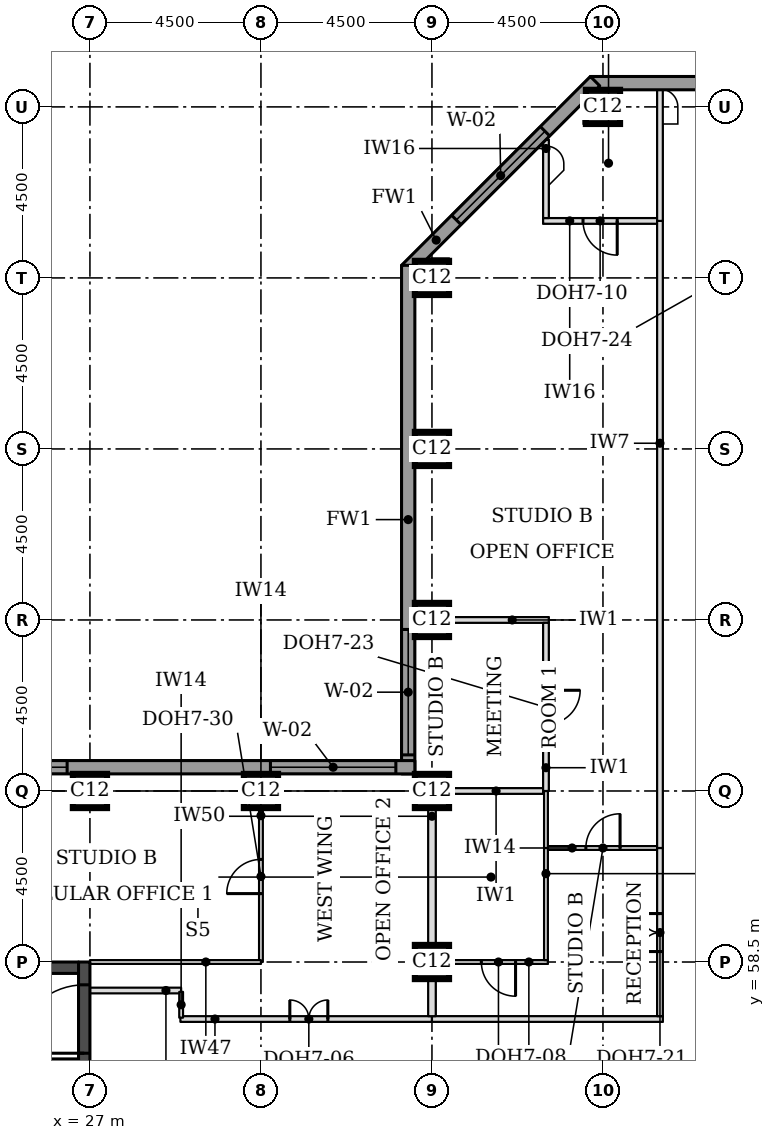
"""IFC4 building model, lengths in metres.
Left out: names, types, materials, properties, quantities, classifications, styles, units other than length and angle.
Written with IfcOpenShell. Run it as: python <this file> out.ifc"""

import sys

from ifc_helpers import new_model, si_unit, direction, frame, frame_2d, origin, origin_2d, place, context, subcontext, project, spatial, rectangle, extrude, element, fill, save


model = new_model("IFC4")
c1 = context("Model", 3, precision=1e-05, world=origin(), true_north=direction((0.0, 1.0)))
c2 = subcontext(c1, "Body", "Model", "MODEL_VIEW")
j1 = project(units=[si_unit("LENGTHUNIT", "METRE"), si_unit("PLANEANGLEUNIT", "RADIAN")], contexts=[c1])
p1 = place(None, origin())
s1 = spatial("IfcSite", under=j1, at=p1, CompositionType="ELEMENT")
p2 = place(p1, origin())
s2 = spatial("IfcBuilding", under=s1, at=p2, CompositionType="ELEMENT")
p3 = place(p2, frame((0.0, 0.0, 192.1)))
s3 = spatial("IfcBuildingStorey", under=s2, at=p3, CompositionType="ELEMENT", Elevation=192.1)
for number, where, z_axis, x_axis in (
    (1, (36.0, 58.5, 0.0), (0.0, 0.0, 1.0), (1.0, 0.0, 0.0)),
    (2, (27.0, 63.0, 0.0), (0.0, 0.0, 1.0), (1.0, 0.0, 0.0)),
    (3, (31.5, 63.0, 0.0), (0.0, 0.0, 1.0), (1.0, 0.0, 0.0)),
    (4, (36.0, 63.0, 0.0), (0.0, 0.0, 1.0), (1.0, 0.0, 0.0)),
    (5, (36.0, 67.5, 0.0), (0.0, 0.0, 1.0), (1.0, 0.0, 0.0)),
    (6, (36.0, 72.0, 0.0), (0.0, 0.0, 1.0), (1.0, 0.0, 0.0)),
    (7, (36.0, 76.5, 0.0), (0.0, 0.0, 1.0), (1.0, 0.0, 0.0)),
    (8, (40.5, 81.0, 0.0), (0.0, 0.0, 1.0), (1.0, 0.0, 0.0)),
):
    element("IfcColumn", number, at=place(p3, frame(where, z_axis=z_axis, x_axis=x_axis)), inside=s3, PredefinedType="COLUMN", context=c2, shape_type="SweptSolid", body=[
        extrude(rectangle(XDim=0.9, YDim=0.9, at=origin_2d()), origin(), (0.0, 0.0, 1.0), 3.7),
    ])
p4 = place(p3, frame((18.3, 58.35, 0.0), z_axis=(0.0, 0.0, 1.0), x_axis=(1.0, 0.0, 0.0)))
e9 = element("IfcWall", 9, at=p4, inside=s3, PredefinedType="SHEAR", context=c2, shape_type="SweptSolid", body=[
    extrude(rectangle(XDim=8.4, YDim=0.3, at=frame_2d((4.2, 0.0))), origin(), (0.0, 0.0, 1.0), 3.7),
])
p5 = place(p3, frame((26.85, 49.5, 0.0), z_axis=(0.0, 0.0, 1.0), x_axis=(0.0, 1.0, 0.0)))
e10 = element("IfcWall", 10, at=p5, inside=s3, PredefinedType="SHEAR", context=c2, shape_type="SweptSolid", body=[
    extrude(rectangle(XDim=9.0, YDim=0.3, at=frame_2d((4.5, 0.0))), origin(), (0.0, 0.0, 1.0), 3.7),
])
p6 = place(p5, frame((6.6, 0.0, 0.0)))
e11 = element("IfcOpeningElement", 11, at=p6, cuts=e10, PredefinedType="OPENING", context=c2, shape_type="SweptSolid", body=[
    extrude(rectangle(XDim=1.8, YDim=2.1, at=frame_2d((0.9, 1.05))), frame((0.0, 0.16, 0.0), z_axis=(0.0, -1.0, 0.0), x_axis=(1.0, 0.0, 0.0)), (0.0, 0.0, 1.0), 0.32),
])
p7 = place(p3, frame((72.331, 81.625, 0.0), z_axis=(0.0, 0.0, 1.0), x_axis=(-1.0, 0.0, 0.0)))
e12 = element("IfcWall", 12, at=p7, inside=s3, PredefinedType="STANDARD", context=c2, shape_type="SweptSolid", body=[
    extrude(rectangle(XDim=32.163, YDim=0.35, at=frame_2d((16.081, 0.0))), origin(), (0.0, 0.0, 1.0), 3.525),
])
p8 = place(p7, frame((5.431, 0.0, 0.9)))
e13 = element("IfcOpeningElement", 13, at=p8, cuts=e12, PredefinedType="OPENING", context=c2, shape_type="SweptSolid", body=[
    extrude(rectangle(XDim=3.3, YDim=1.9, at=frame_2d((1.65, 0.95))), frame((0.0, 0.185, 0.0), z_axis=(0.0, -1.0, 0.0), x_axis=(1.0, 0.0, 0.0)), (0.0, 0.0, 1.0), 0.37),
])
p9 = place(p7, frame((9.931, 0.0, 0.9)))
e14 = element("IfcOpeningElement", 14, at=p9, cuts=e12, PredefinedType="OPENING", context=c2, shape_type="SweptSolid", body=[
    extrude(rectangle(XDim=3.3, YDim=1.9, at=frame_2d((1.65, 0.95))), frame((0.0, 0.185, 0.0), z_axis=(0.0, -1.0, 0.0), x_axis=(1.0, 0.0, 0.0)), (0.0, 0.0, 1.0), 0.37),
])
p10 = place(p7, frame((14.431, 0.0, 0.9)))
e15 = element("IfcOpeningElement", 15, at=p10, cuts=e12, PredefinedType="OPENING", context=c2, shape_type="SweptSolid", body=[
    extrude(rectangle(XDim=3.3, YDim=1.9, at=frame_2d((1.65, 0.95))), frame((0.0, 0.185, 0.0), z_axis=(0.0, -1.0, 0.0), x_axis=(1.0, 0.0, 0.0)), (0.0, 0.0, 1.0), 0.37),
])
p11 = place(p7, frame((18.931, 0.0, 0.9)))
e16 = element("IfcOpeningElement", 16, at=p11, cuts=e12, PredefinedType="OPENING", context=c2, shape_type="SweptSolid", body=[
    extrude(rectangle(XDim=3.3, YDim=1.9, at=frame_2d((1.65, 0.95))), frame((0.0, 0.185, 0.0), z_axis=(0.0, -1.0, 0.0), x_axis=(1.0, 0.0, 0.0)), (0.0, 0.0, 1.0), 0.37),
])
p12 = place(p7, frame((23.431, 0.0, 0.9)))
e17 = element("IfcOpeningElement", 17, at=p12, cuts=e12, PredefinedType="OPENING", context=c2, shape_type="SweptSolid", body=[
    extrude(rectangle(XDim=3.3, YDim=1.9, at=frame_2d((1.65, 0.95))), frame((0.0, 0.185, 0.0), z_axis=(0.0, -1.0, 0.0), x_axis=(1.0, 0.0, 0.0)), (0.0, 0.0, 1.0), 0.37),
])
p13 = place(p3, frame((40.292, 81.676, 0.0), z_axis=(0.0, 0.0, 1.0), x_axis=(-0.707106781187, -0.707106781187, 0.0)))
e18 = element("IfcWall", 18, at=p13, inside=s3, PredefinedType="STANDARD", context=c2, shape_type="SweptSolid", body=[
    extrude(rectangle(XDim=7.027, YDim=0.35, at=frame_2d((3.513, 0.0))), origin(), (0.0, 0.0, 1.0), 3.525),
])
p14 = place(p13, frame((1.863, 0.0, 0.9)))
e19 = element("IfcOpeningElement", 19, at=p14, cuts=e18, PredefinedType="OPENING", context=c2, shape_type="SweptSolid", body=[
    extrude(rectangle(XDim=3.3, YDim=1.9, at=frame_2d((1.65, 0.95))), frame((0.0, 0.185, 0.0), z_axis=(0.0, -1.0, 0.0), x_axis=(1.0, 0.0, 0.0)), (0.0, 0.0, 1.0), 0.37),
])
p15 = place(p3, frame((35.375, 76.831, 0.0), z_axis=(0.0, 0.0, 1.0), x_axis=(0.0, -1.0, 0.0)))
e20 = element("IfcWall", 20, at=p15, inside=s3, PredefinedType="STANDARD", context=c2, shape_type="SweptSolid", body=[
    extrude(rectangle(XDim=13.381, YDim=0.35, at=frame_2d((6.691, 0.0))), origin(), (0.0, 0.0, 1.0), 3.525),
])
p16 = place(p15, frame((9.581, 0.0, 0.9)))
e21 = element("IfcOpeningElement", 21, at=p16, cuts=e20, PredefinedType="OPENING", context=c2, shape_type="SweptSolid", body=[
    extrude(rectangle(XDim=3.3, YDim=1.9, at=frame_2d((1.65, 0.95))), frame((0.0, 0.185, 0.0), z_axis=(0.0, -1.0, 0.0), x_axis=(1.0, 0.0, 0.0)), (0.0, 0.0, 1.0), 0.37),
])
p17 = place(p3, frame((35.55, 63.625, 0.0), z_axis=(0.0, 0.0, 1.0), x_axis=(-1.0, 0.0, 0.0)))
e22 = element("IfcWall", 22, at=p17, inside=s3, PredefinedType="STANDARD", context=c2, shape_type="SweptSolid", body=[
    extrude(rectangle(XDim=17.881, YDim=0.35, at=frame_2d((8.941, 0.0))), origin(), (0.0, 0.0, 1.0), 3.525),
])
p18 = place(p17, frame((0.5, 0.0, 0.9)))
e23 = element("IfcOpeningElement", 23, at=p18, cuts=e22, PredefinedType="OPENING", context=c2, shape_type="SweptSolid", body=[
    extrude(rectangle(XDim=3.3, YDim=1.9, at=frame_2d((1.65, 0.95))), frame((0.0, 0.185, 0.0), z_axis=(0.0, -1.0, 0.0), x_axis=(1.0, 0.0, 0.0)), (0.0, 0.0, 1.0), 0.37),
])
p19 = place(p17, frame((9.15, 0.0, 0.9)))
e24 = element("IfcOpeningElement", 24, at=p19, cuts=e22, PredefinedType="OPENING", context=c2, shape_type="SweptSolid", body=[
    extrude(rectangle(XDim=3.3, YDim=1.9, at=frame_2d((1.65, 0.95))), frame((0.0, 0.185, 0.0), z_axis=(0.0, -1.0, 0.0), x_axis=(1.0, 0.0, 0.0)), (0.0, 0.0, 1.0), 0.37),
])
p20 = place(p3, frame((29.38, 57.0, 0.0), z_axis=(0.0, 0.0, 1.0), x_axis=(1.0, 0.0, 0.0)))
e25 = element("IfcWall", 25, at=p20, inside=s3, PredefinedType="PARTITIONING", context=c2, shape_type="SweptSolid", body=[
    extrude(rectangle(XDim=6.62, YDim=0.15, at=frame_2d((3.31, 0.0))), origin(), (0.0, 0.0, 1.0), 3.55),
])
p21 = place(p20, frame((2.88, 0.0, 0.0)))
e26 = element("IfcOpeningElement", 26, at=p21, cuts=e25, PredefinedType="OPENING", context=c2, shape_type="SweptSolid", body=[
    extrude(rectangle(XDim=1.0, YDim=2.1, at=frame_2d((0.5, 1.05))), frame((0.0, 0.085, 0.0), z_axis=(0.0, -1.0, 0.0), x_axis=(1.0, 0.0, 0.0)), (0.0, 0.0, 1.0), 0.17),
])
p22 = place(p3, frame((36.0, 57.0, 0.0), z_axis=(0.0, 0.0, 1.0), x_axis=(1.0, 0.0, 0.0)))
e27 = element("IfcWall", 27, at=p22, inside=s3, PredefinedType="PARTITIONING", context=c2, shape_type="SweptSolid", body=[
    extrude(rectangle(XDim=6.075, YDim=0.15, at=frame_2d((3.038, 0.0))), origin(), (0.0, 0.0, 1.0), 3.55),
])
p23 = place(p3, frame((36.45, 58.5, 0.0), z_axis=(0.0, 0.0, 1.0), x_axis=(1.0, 0.0, 0.0)))
e28 = element("IfcWall", 28, at=p23, inside=s3, PredefinedType="PARTITIONING", context=c2, shape_type="SweptSolid", body=[
    extrude(rectangle(XDim=2.6, YDim=0.1, at=frame_2d((1.3, 0.0))), origin(), (0.0, 0.0, 1.0), 3.55),
])
p24 = place(p23, frame((0.85, 0.0, 0.0)))
e29 = element("IfcOpeningElement", 29, at=p24, cuts=e28, PredefinedType="OPENING", context=c2, shape_type="SweptSolid", body=[
    extrude(rectangle(XDim=0.9, YDim=2.1, at=frame_2d((0.45, 1.05))), frame((0.0, 0.06, 0.0), z_axis=(0.0, -1.0, 0.0), x_axis=(1.0, 0.0, 0.0)), (0.0, 0.0, 1.0), 0.12),
])
p25 = place(p3, frame((39.05, 61.5, 0.0), z_axis=(0.0, 0.0, 1.0), x_axis=(1.0, 0.0, 0.0)))
e30 = element("IfcWall", 30, at=p25, inside=s3, PredefinedType="PARTITIONING", context=c2, shape_type="SweptSolid", body=[
    extrude(rectangle(XDim=2.875, YDim=0.1, at=frame_2d((1.438, 0.0))), origin(), (0.0, 0.0, 1.0), 3.55),
])
p26 = place(p25, frame((1.0, 0.0, 0.0)))
e31 = element("IfcOpeningElement", 31, at=p26, cuts=e30, PredefinedType="OPENING", context=c2, shape_type="SweptSolid", body=[
    extrude(rectangle(XDim=0.9, YDim=2.1, at=frame_2d((0.45, 1.05))), frame((0.0, 0.06, 0.0), z_axis=(0.0, -1.0, 0.0), x_axis=(1.0, 0.0, 0.0)), (0.0, 0.0, 1.0), 0.12),
])
p27 = place(p3, frame((36.45, 63.0, 0.0), z_axis=(0.0, 0.0, 1.0), x_axis=(1.0, 0.0, 0.0)))
e32 = element("IfcWall", 32, at=p27, inside=s3, PredefinedType="PARTITIONING", context=c2, shape_type="SweptSolid", body=[
    extrude(rectangle(XDim=2.475, YDim=0.15, at=frame_2d((1.238, 0.0))), origin(), (0.0, 0.0, 1.0), 3.55),
])
p28 = place(p3, frame((35.55, 67.5, 0.0), z_axis=(0.0, 0.0, 1.0), x_axis=(1.0, 0.0, 0.0)))
e33 = element("IfcWall", 33, at=p28, inside=s3, PredefinedType="PARTITIONING", context=c2, shape_type="SweptSolid", body=[
    extrude(rectangle(XDim=3.525, YDim=0.15, at=frame_2d((1.762, 0.0))), origin(), (0.0, 0.0, 1.0), 3.55),
])
p29 = place(p3, frame((38.925, 78.0, 0.0), z_axis=(0.0, 0.0, 1.0), x_axis=(1.0, 0.0, 0.0)))
e34 = element("IfcWall", 34, at=p29, inside=s3, PredefinedType="PARTITIONING", context=c2, shape_type="SweptSolid", body=[
    extrude(rectangle(XDim=3.0, YDim=0.15, at=frame_2d((1.5, 0.0))), origin(), (0.0, 0.0, 1.0), 3.55),
])
p30 = place(p29, frame((1.05, 0.0, 0.0)))
e35 = element("IfcOpeningElement", 35, at=p30, cuts=e34, PredefinedType="OPENING", context=c2, shape_type="SweptSolid", body=[
    extrude(rectangle(XDim=0.9, YDim=2.1, at=frame_2d((0.45, 1.05))), frame((0.0, 0.085, 0.0), z_axis=(0.0, -1.0, 0.0), x_axis=(1.0, 0.0, 0.0)), (0.0, 0.0, 1.0), 0.17),
])
p31 = place(p3, frame((36.0, 57.075, 0.0), z_axis=(0.0, 0.0, 1.0), x_axis=(0.0, 1.0, 0.0)))
e36 = element("IfcWall", 36, at=p31, inside=s3, PredefinedType="PARTITIONING", context=c2, shape_type="SweptSolid", body=[
    extrude(rectangle(XDim=0.975, YDim=0.2, at=frame_2d((0.488, 0.0))), origin(), (0.0, 0.0, 1.0), 2.8),
])
p32 = place(p3, frame((42.0, 57.075, 0.0), z_axis=(0.0, 0.0, 1.0), x_axis=(0.0, 1.0, 0.0)))
e37 = element("IfcWall", 37, at=p32, inside=s3, PredefinedType="PARTITIONING", context=c2, shape_type="SweptSolid", body=[
    extrude(rectangle(XDim=4.425, YDim=0.15, at=frame_2d((2.212, 0.0))), origin(), (0.0, 0.0, 1.0), 3.55),
])
p33 = place(p32, frame((1.7, 0.0, 0.0)))
e38 = element("IfcOpeningElement", 38, at=p33, cuts=e37, PredefinedType="OPENING", context=c2, shape_type="SweptSolid", body=[
    extrude(rectangle(XDim=1.0, YDim=2.1, at=frame_2d((0.5, 1.05))), frame((0.0, 0.085, 0.0), z_axis=(0.0, -1.0, 0.0), x_axis=(1.0, 0.0, 0.0)), (0.0, 0.0, 1.0), 0.17),
])
p34 = place(p3, frame((39.0, 58.55, 0.0), z_axis=(0.0, 0.0, 1.0), x_axis=(0.0, 1.0, 0.0)))
e39 = element("IfcWall", 39, at=p34, inside=s3, PredefinedType="PARTITIONING", context=c2, shape_type="SweptSolid", body=[
    extrude(rectangle(XDim=2.95, YDim=0.1, at=frame_2d((1.475, 0.0))), origin(), (0.0, 0.0, 1.0), 3.55),
])
p35 = place(p3, frame((36.0, 58.92, 0.0), z_axis=(0.0, 0.0, 1.0), x_axis=(0.0, 1.0, 0.0)))
e40 = element("IfcWall", 40, at=p35, inside=s3, PredefinedType="PARTITIONING", context=c2, shape_type="SweptSolid", body=[
    extrude(rectangle(XDim=3.63, YDim=0.2, at=frame_2d((1.815, 0.0))), origin(), (0.0, 0.0, 1.0), 2.8),
])
p36 = place(p3, frame((39.0, 61.5, 0.0), z_axis=(0.0, 0.0, 1.0), x_axis=(0.0, 1.0, 0.0)))
e41 = element("IfcWall", 41, at=p36, inside=s3, PredefinedType="PARTITIONING", context=c2, shape_type="SweptSolid", body=[
    extrude(rectangle(XDim=1.5, YDim=0.1, at=frame_2d((0.75, 0.0))), origin(), (0.0, 0.0, 1.0), 3.55),
])
p37 = place(p3, frame((42.0, 61.5, 0.0), z_axis=(0.0, 0.0, 1.0), x_axis=(0.0, 1.0, 0.0)))
e42 = element("IfcWall", 42, at=p37, inside=s3, PredefinedType="PARTITIONING", context=c2, shape_type="SweptSolid", body=[
    extrude(rectangle(XDim=16.5, YDim=0.15, at=frame_2d((8.25, 0.0))), origin(), (0.0, 0.0, 1.0), 3.55),
])
p38 = place(p3, frame((39.0, 63.0, 0.0), z_axis=(0.0, 0.0, 1.0), x_axis=(0.0, 1.0, 0.0)))
e43 = element("IfcWall", 43, at=p38, inside=s3, PredefinedType="PARTITIONING", context=c2, shape_type="SweptSolid", body=[
    extrude(rectangle(XDim=4.425, YDim=0.15, at=frame_2d((2.212, 0.0))), origin(), (0.0, 0.0, 1.0), 3.55),
])
p39 = place(p38, frame((1.75, 0.0, 0.0)))
e44 = element("IfcOpeningElement", 44, at=p39, cuts=e43, PredefinedType="OPENING", context=c2, shape_type="SweptSolid", body=[
    extrude(rectangle(XDim=0.9, YDim=2.1, at=frame_2d((0.45, 1.05))), frame((0.0, 0.085, 0.0), z_axis=(0.0, -1.0, 0.0), x_axis=(1.0, 0.0, 0.0)), (0.0, 0.0, 1.0), 0.17),
])
p40 = place(p3, frame((42.0, 78.0, 0.0), z_axis=(0.0, 0.0, 1.0), x_axis=(0.0, 1.0, 0.0)))
e45 = element("IfcWall", 45, at=p40, inside=s3, PredefinedType="PARTITIONING", context=c2, shape_type="SweptSolid", body=[
    extrude(rectangle(XDim=3.45, YDim=0.15, at=frame_2d((1.725, 0.0))), origin(), (0.0, 0.0, 1.0), 3.55),
])
p41 = place(p3, frame((39.0, 78.075, 0.0), z_axis=(0.0, 0.0, 1.0), x_axis=(0.0, 1.0, 0.0)))
e46 = element("IfcWall", 46, at=p41, inside=s3, PredefinedType="PARTITIONING", context=c2, shape_type="SweptSolid", body=[
    extrude(rectangle(XDim=2.062, YDim=0.15, at=frame_2d((1.031, 0.0))), origin(), (0.0, 0.0, 1.0), 3.55),
])
p42 = place(p3, frame((31.5, 63.0, 0.0), z_axis=(0.0, 0.0, 1.0), x_axis=(0.0, -1.0, 0.0)))
e47 = element("IfcWall", 47, at=p42, inside=s3, PredefinedType="PARTITIONING", context=c2, shape_type="SweptSolid", body=[
    extrude(rectangle(XDim=4.5, YDim=0.1, at=frame_2d((2.25, 0.0))), origin(), (0.0, 0.0, 1.0), 3.55),
])
p43 = place(p42, frame((1.8, 0.0, 0.0)))
e48 = element("IfcOpeningElement", 48, at=p43, cuts=e47, PredefinedType="OPENING", context=c2, shape_type="SweptSolid", body=[
    extrude(rectangle(XDim=0.9, YDim=2.1, at=frame_2d((0.45, 1.05))), frame((0.0, 0.06, 0.0), z_axis=(0.0, -1.0, 0.0), x_axis=(1.0, 0.0, 0.0)), (0.0, 0.0, 1.0), 0.12),
])
p44 = place(p3, frame((31.5, 58.5, 0.0), z_axis=(0.0, 0.0, 1.0), x_axis=(-1.0, 0.0, 0.0)))
e49 = element("IfcWall", 49, at=p44, inside=s3, PredefinedType="PARTITIONING", context=c2, shape_type="SweptSolid", body=[
    extrude(rectangle(XDim=4.5, YDim=0.1, at=frame_2d((2.25, 0.0))), origin(), (0.0, 0.0, 1.0), 2.55),
])
p45 = place(p3, frame((27.0, 57.75, 0.0), z_axis=(0.0, 0.0, 1.0), x_axis=(1.0, 0.0, 0.0)))
e50 = element("IfcWall", 50, at=p45, inside=s3, PredefinedType="PARTITIONING", context=c2, shape_type="SweptSolid", body=[
    extrude(rectangle(XDim=2.4, YDim=0.15, at=frame_2d((1.2, 0.0))), origin(), (0.0, 0.0, 1.0), 3.55),
])
p46 = place(p3, frame((29.4, 57.715, 0.0), z_axis=(0.0, 0.0, 1.0), x_axis=(0.0, -1.0, 0.0)))
e51 = element("IfcWall", 51, at=p46, inside=s3, PredefinedType="PARTITIONING", context=c2, shape_type="SweptSolid", body=[
    extrude(rectangle(XDim=0.68, YDim=0.1, at=frame_2d((0.34, 0.0))), origin(), (0.0, 0.0, 1.0), 3.55),
])
p47 = place(p3, frame((23.2, 55.85, 0.0), z_axis=(0.0, 0.0, 1.0), x_axis=(1.0, 0.0, 0.0)))
e52 = element("IfcWall", 52, at=p47, inside=s3, PredefinedType="SOLIDWALL", context=c2, shape_type="SweptSolid", body=[
    extrude(rectangle(XDim=3.5, YDim=0.2, at=frame_2d((1.75, 0.0))), origin(), (0.0, 0.0, 1.0), 3.55),
])
p48 = place(p47, frame((1.2, 0.0, 0.0)))
e53 = element("IfcOpeningElement", 53, at=p48, cuts=e52, PredefinedType="OPENING", context=c2, shape_type="SweptSolid", body=[
    extrude(rectangle(XDim=1.1, YDim=2.1, at=frame_2d((0.55, 1.05))), frame((0.0, 0.11, 0.0), z_axis=(0.0, -1.0, 0.0), x_axis=(1.0, 0.0, 0.0)), (0.0, 0.0, 1.0), 0.22),
])
p49 = place(p14, origin())
e54 = element("IfcWindow", 54, at=p49, inside=s3, PartitioningType="SINGLE_PANEL", PredefinedType="WINDOW", context=c2, shape_type="SweptSolid", body=[
    extrude(rectangle(XDim=3.3, YDim=1.9, at=frame_2d((1.65, 0.95))), frame((0.0, 0.085, 0.0), z_axis=(0.0, -1.0, 0.0), x_axis=(1.0, 0.0, 0.0)), (0.0, 0.0, 1.0), 0.06),
])
fill(e19, e54)
p50 = place(p16, origin())
e55 = element("IfcWindow", 55, at=p50, inside=s3, PartitioningType="SINGLE_PANEL", PredefinedType="WINDOW", context=c2, shape_type="SweptSolid", body=[
    extrude(rectangle(XDim=3.3, YDim=1.9, at=frame_2d((1.65, 0.95))), frame((0.0, 0.085, 0.0), z_axis=(0.0, -1.0, 0.0), x_axis=(1.0, 0.0, 0.0)), (0.0, 0.0, 1.0), 0.06),
])
fill(e21, e55)
p51 = place(p18, origin())
e56 = element("IfcWindow", 56, at=p51, inside=s3, PartitioningType="SINGLE_PANEL", PredefinedType="WINDOW", context=c2, shape_type="SweptSolid", body=[
    extrude(rectangle(XDim=3.3, YDim=1.9, at=frame_2d((1.65, 0.95))), frame((0.0, 0.085, 0.0), z_axis=(0.0, -1.0, 0.0), x_axis=(1.0, 0.0, 0.0)), (0.0, 0.0, 1.0), 0.06),
])
fill(e23, e56)
p52 = place(p19, origin())
e57 = element("IfcWindow", 57, at=p52, inside=s3, PartitioningType="SINGLE_PANEL", PredefinedType="WINDOW", context=c2, shape_type="SweptSolid", body=[
    extrude(rectangle(XDim=3.3, YDim=1.9, at=frame_2d((1.65, 0.95))), frame((0.0, 0.085, 0.0), z_axis=(0.0, -1.0, 0.0), x_axis=(1.0, 0.0, 0.0)), (0.0, 0.0, 1.0), 0.06),
])
fill(e24, e57)
p53 = place(p33, origin())
e58 = element("IfcDoor", 58, at=p53, inside=s3, OperationType="DOUBLE_DOOR_SINGLE_SWING", PredefinedType="DOOR", context=c2, shape_type="SweptSolid", body=[
    extrude(rectangle(XDim=1.0, YDim=2.1, at=frame_2d((0.5, 1.05))), frame((0.0, 0.025, 0.0), z_axis=(0.0, -1.0, 0.0), x_axis=(1.0, 0.0, 0.0)), (0.0, 0.0, 1.0), 0.05),
])
fill(e38, e58)
p54 = place(p26, origin())
e59 = element("IfcDoor", 59, at=p54, inside=s3, OperationType="SINGLE_SWING_RIGHT", PredefinedType="DOOR", context=c2, shape_type="SweptSolid", body=[
    extrude(rectangle(XDim=0.9, YDim=2.1, at=frame_2d((0.45, 1.05))), frame((0.0, 0.025, 0.0), z_axis=(0.0, -1.0, 0.0), x_axis=(1.0, 0.0, 0.0)), (0.0, 0.0, 1.0), 0.05),
])
fill(e31, e59)
p55 = place(p24, frame((0.9, 0.0, 0.0), z_axis=(0.0, 0.0, 1.0), x_axis=(-1.0, 0.0, 0.0)))
e60 = element("IfcDoor", 60, at=p55, inside=s3, OperationType="SINGLE_SWING_LEFT", PredefinedType="DOOR", context=c2, shape_type="SweptSolid", body=[
    extrude(rectangle(XDim=0.9, YDim=2.1, at=frame_2d((0.45, 1.05))), frame((0.0, 0.025, 0.0), z_axis=(0.0, -1.0, 0.0), x_axis=(1.0, 0.0, 0.0)), (0.0, 0.0, 1.0), 0.05),
])
fill(e29, e60)
p56 = place(p39, frame((0.9, 0.0, 0.0), z_axis=(0.0, 0.0, 1.0), x_axis=(-1.0, 0.0, 0.0)))
e61 = element("IfcDoor", 61, at=p56, inside=s3, OperationType="SINGLE_SWING_LEFT", PredefinedType="DOOR", context=c2, shape_type="SweptSolid", body=[
    extrude(rectangle(XDim=0.9, YDim=2.1, at=frame_2d((0.45, 1.05))), frame((0.0, 0.025, 0.0), z_axis=(0.0, -1.0, 0.0), x_axis=(1.0, 0.0, 0.0)), (0.0, 0.0, 1.0), 0.05),
])
fill(e44, e61)
p57 = place(p30, frame((0.9, 0.0, 0.0), z_axis=(0.0, 0.0, 1.0), x_axis=(-1.0, 0.0, 0.0)))
e62 = element("IfcDoor", 62, at=p57, inside=s3, OperationType="SINGLE_SWING_LEFT", PredefinedType="DOOR", context=c2, shape_type="SweptSolid", body=[
    extrude(rectangle(XDim=0.9, YDim=2.1, at=frame_2d((0.45, 1.05))), frame((0.0, 0.025, 0.0), z_axis=(0.0, -1.0, 0.0), x_axis=(1.0, 0.0, 0.0)), (0.0, 0.0, 1.0), 0.05),
])
fill(e35, e62)
p58 = place(p21, origin())
e63 = element("IfcDoor", 63, at=p58, inside=s3, OperationType="DOUBLE_DOOR_SINGLE_SWING", PredefinedType="DOOR", context=c2, shape_type="SweptSolid", body=[
    extrude(rectangle(XDim=1.0, YDim=2.1, at=frame_2d((0.5, 1.05))), frame((0.0, 0.025, 0.0), z_axis=(0.0, -1.0, 0.0), x_axis=(1.0, 0.0, 0.0)), (0.0, 0.0, 1.0), 0.05),
])
fill(e26, e63)
p59 = place(p43, frame((0.9, 0.0, 0.0), z_axis=(0.0, 0.0, 1.0), x_axis=(-1.0, 0.0, 0.0)))
e64 = element("IfcDoor", 64, at=p59, inside=s3, OperationType="SINGLE_SWING_LEFT", PredefinedType="DOOR", context=c2, shape_type="SweptSolid", body=[
    extrude(rectangle(XDim=0.9, YDim=2.1, at=frame_2d((0.45, 1.05))), frame((0.0, 0.025, 0.0), z_axis=(0.0, -1.0, 0.0), x_axis=(1.0, 0.0, 0.0)), (0.0, 0.0, 1.0), 0.05),
])
fill(e48, e64)
p60 = place(p6, origin())
e65 = element("IfcDoor", 65, at=p60, inside=s3, OperationType="SINGLE_SWING_LEFT", PredefinedType="DOOR", context=c2, shape_type="SweptSolid", body=[
    extrude(rectangle(XDim=1.8, YDim=2.1, at=frame_2d((0.9, 1.05))), frame((0.0, 0.025, 0.0), z_axis=(0.0, -1.0, 0.0), x_axis=(1.0, 0.0, 0.0)), (0.0, 0.0, 1.0), 0.05),
])
fill(e11, e65)
save(model, sys.argv[1])
